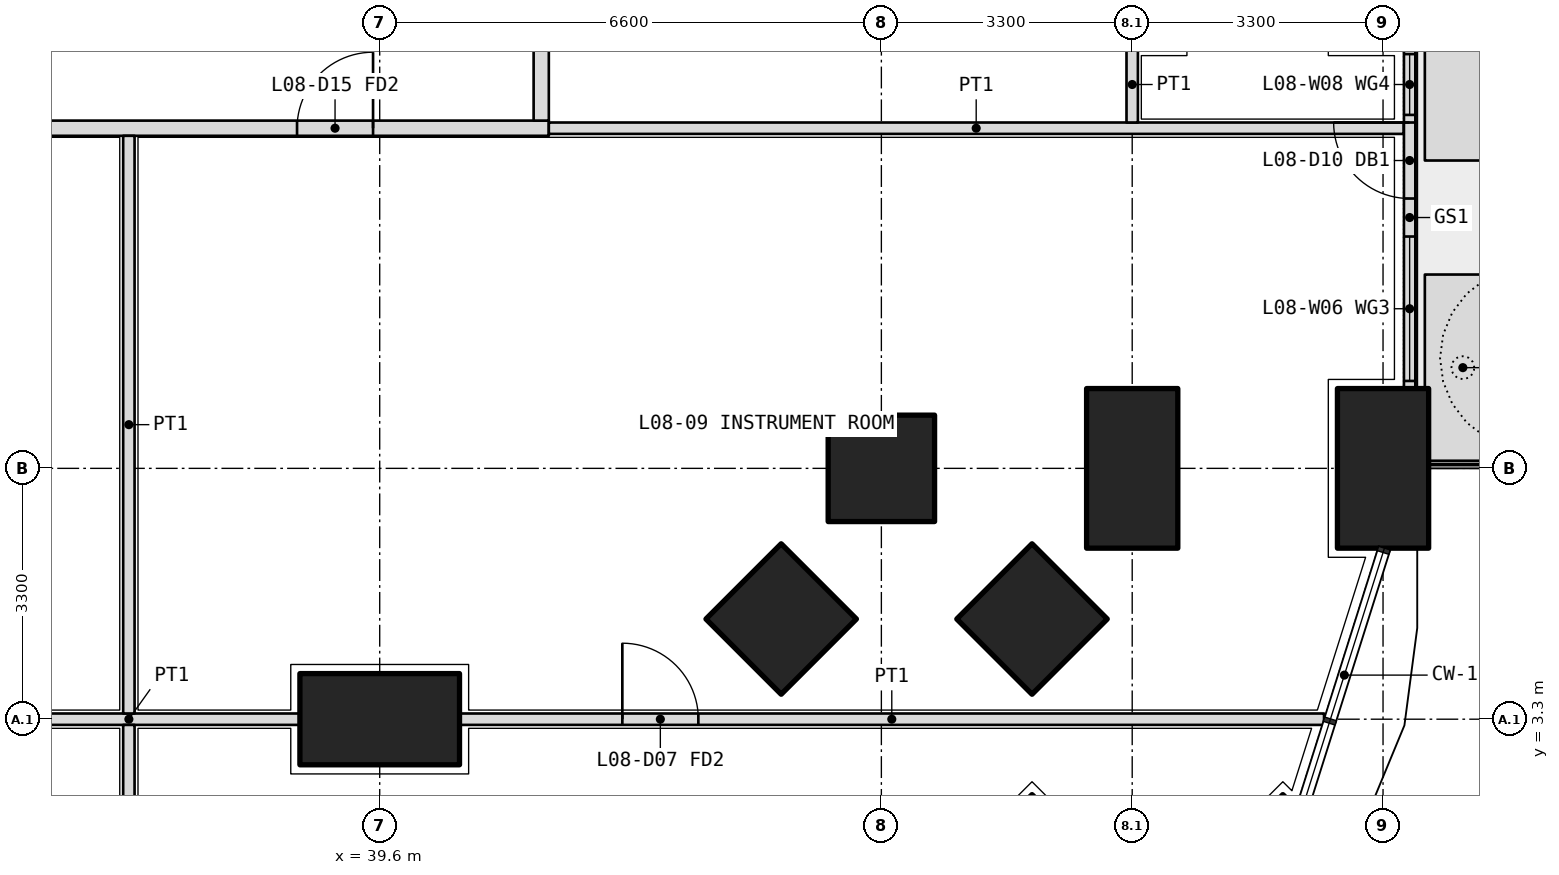
"""IFC4 building model, lengths in metres.
Left out: names, types, materials, properties, quantities, classifications, styles, units other than length and angle.
Written with IfcOpenShell. Run it as: python <this file> out.ifc"""

import sys

from ifc_helpers import new_model, si_unit, direction, frame, frame_2d, origin, origin_2d, place, context, subcontext, project, spatial, polyline, rectangle, outline, extrude, element, fill, save


model = new_model("IFC4")
c1 = context("Model", 3, precision=1e-05, world=origin(), true_north=direction((0.0, 1.0)))
c2 = subcontext(c1, "Body", "Model", "MODEL_VIEW")
j1 = project(units=[si_unit("LENGTHUNIT", "METRE"), si_unit("PLANEANGLEUNIT", "RADIAN")], contexts=[c1])
p1 = place(None, origin())
s1 = spatial("IfcSite", under=j1, at=p1, CompositionType="ELEMENT")
p2 = place(p1, origin())
s2 = spatial("IfcBuilding", under=s1, at=p2, CompositionType="ELEMENT")
p3 = place(p2, frame((0.0, 0.0, 38.1)))
s3 = spatial("IfcBuildingStorey", under=s2, at=p3, CompositionType="ELEMENT", Elevation=38.1)
p4 = place(p3, frame((51.482, 1.318, 0.0), z_axis=(0.0, 0.0, 1.0), x_axis=(0.707106781187, 0.707106781187, 0.0)))
e1 = element("IfcColumn", 1, at=p4, inside=s3, PredefinedType="COLUMN", context=c2, shape_type="SweptSolid", body=[
    extrude(rectangle(XDim=1.4, YDim=1.4, at=origin_2d()), origin(), (0.0, 0.0, 1.0), 4.2),
])
p5 = place(p3, frame((52.8, 6.6, 0.0), z_axis=(0.0, 0.0, 1.0), x_axis=(0.0, 1.0, 0.0)))
e2 = element("IfcColumn", 2, at=p5, inside=s3, PredefinedType="COLUMN", context=c2, shape_type="SweptSolid", body=[
    extrude(rectangle(XDim=2.1, YDim=1.2, at=origin_2d()), origin(), (0.0, 0.0, 1.0), 4.2),
])
for number, where, z_axis, x_axis in (
    (3, (46.2, 6.6, 0.0), (0.0, 0.0, 1.0), (1.0, 0.0, 0.0)),
    (4, (48.182, 1.318, 0.0), (0.0, 0.0, 1.0), (0.707, 0.707, 0.0)),
):
    element("IfcColumn", number, at=place(p3, frame(where, z_axis=z_axis, x_axis=x_axis)), inside=s3, PredefinedType="COLUMN", context=c2, shape_type="SweptSolid", body=[
        extrude(rectangle(XDim=1.4, YDim=1.4, at=origin_2d()), origin(), (0.0, 0.0, 1.0), 4.2),
    ])
p6 = place(p3, frame((49.5, 6.6, 0.0), z_axis=(0.0, 0.0, 1.0), x_axis=(0.0, 1.0, 0.0)))
e5 = element("IfcColumn", 5, at=p6, inside=s3, PredefinedType="COLUMN", context=c2, shape_type="SweptSolid", body=[
    extrude(rectangle(XDim=2.1, YDim=1.2, at=origin_2d()), origin(), (0.0, 0.0, 1.0), 4.2),
])
p7 = place(p3, frame((48.182, 4.618, 0.0), z_axis=(0.0, 0.0, 1.0), x_axis=(0.707106781187, 0.707106781187, 0.0)))
e6 = element("IfcColumn", 6, at=p7, inside=s3, PredefinedType="COLUMN", context=c2, shape_type="SweptSolid", body=[
    extrude(rectangle(XDim=1.4, YDim=1.4, at=origin_2d()), origin(), (0.0, 0.0, 1.0), 4.2),
])
p8 = place(p3, frame((39.6, 3.3, 0.0), z_axis=(0.0, 0.0, 1.0), x_axis=(1.0, 0.0, 0.0)))
e7 = element("IfcColumn", 7, at=p8, inside=s3, PredefinedType="COLUMN", context=c2, shape_type="SweptSolid", body=[
    extrude(rectangle(XDim=2.1, YDim=1.2, at=origin_2d()), origin(), (0.0, 0.0, 1.0), 4.2),
])
p9 = place(p3, frame((44.882, 4.618, 0.0), z_axis=(0.0, 0.0, 1.0), x_axis=(0.707106781187, 0.707106781187, 0.0)))
e8 = element("IfcColumn", 8, at=p9, inside=s3, PredefinedType="COLUMN", context=c2, shape_type="SweptSolid", body=[
    extrude(rectangle(XDim=1.4, YDim=1.4, at=origin_2d()), origin(), (0.0, 0.0, 1.0), 4.2),
])
p10 = place(p3, origin())
e9 = element("IfcWall", 9, at=p10, inside=s3, PredefinedType="USERDEFINED", context=c2, shape_type="SweptSolid", body=[
    extrude(outline(polyline([(53.35, 6.7), (54.35, 6.7), (54.35, 9.15), (53.35, 9.15), (53.35, 6.7)]), holes=[polyline([(53.5, 6.85), (54.2, 6.85), (54.2, 9.0), (53.5, 9.0), (53.5, 6.85)])]), origin(), (0.0, 0.0, 1.0), 1.05),
])
p11 = place(p3, origin())
e10 = element("IfcWall", 10, at=p11, inside=s3, PredefinedType="USERDEFINED", context=c2, shape_type="SweptSolid", body=[
    extrude(outline(polyline([(53.35, 10.65), (54.35, 10.65), (54.35, 19.7), (53.35, 19.7), (53.35, 10.65)]), holes=[polyline([(53.5, 10.8), (54.2, 10.8), (54.2, 19.55), (53.5, 19.55), (53.5, 10.8)])]), origin(), (0.0, 0.0, 1.0), 1.05),
])
p12 = place(p3, frame((53.15, 7.65, 0.0), z_axis=(0.0, 0.0, 1.0), x_axis=(0.0, 1.0, 0.0)))
e11 = element("IfcWall", 11, at=p12, inside=s3, PredefinedType="SOLIDWALL", context=c2, shape_type="SweptSolid", body=[
    extrude(rectangle(XDim=4.5, YDim=0.15, at=frame_2d((2.25, 0.0))), origin(), (0.0, 0.0, 1.0), 2.7),
])
p13 = place(p12, frame((2.5, 0.0, 0.0)))
e12 = element("IfcOpeningElement", 12, at=p13, cuts=e11, PredefinedType="OPENING", context=c2, shape_type="SweptSolid", body=[
    extrude(rectangle(XDim=1.0, YDim=2.4, at=frame_2d((0.5, 1.2))), frame((0.0, 0.085, 0.0), z_axis=(0.0, -1.0, 0.0), x_axis=(1.0, 0.0, 0.0)), (0.0, 0.0, 1.0), 0.17),
])
p14 = place(p12, frame((0.1, 0.0, 0.1)))
e13 = element("IfcOpeningElement", 13, at=p14, cuts=e11, PredefinedType="OPENING", context=c2, shape_type="SweptSolid", body=[
    extrude(rectangle(XDim=1.9, YDim=2.3, at=frame_2d((0.95, 1.15))), frame((0.0, 0.085, 0.0), z_axis=(0.0, -1.0, 0.0), x_axis=(1.0, 0.0, 0.0)), (0.0, 0.0, 1.0), 0.17),
])
p15 = place(p12, frame((3.6, 0.0, 0.1)))
e14 = element("IfcOpeningElement", 14, at=p15, cuts=e11, PredefinedType="OPENING", context=c2, shape_type="SweptSolid", body=[
    extrude(rectangle(XDim=0.8, YDim=2.3, at=frame_2d((0.4, 1.15))), frame((0.0, 0.085, 0.0), z_axis=(0.0, -1.0, 0.0), x_axis=(1.0, 0.0, 0.0)), (0.0, 0.0, 1.0), 0.17),
])
p16 = place(p3, frame((10.975, 11.075, 0.0), z_axis=(0.0, 0.0, 1.0), x_axis=(1.0, 0.0, 0.0)))
e15 = element("IfcWall", 15, at=p16, inside=s3, PredefinedType="PARTITIONING", context=c2, shape_type="SweptSolid", body=[
    extrude(rectangle(XDim=30.85, YDim=0.2, at=frame_2d((15.425, 0.0))), origin(), (0.0, 0.0, 1.0), 2.85),
])
p17 = place(p16, frame((2.312, 0.0, 0.0)))
e16 = element("IfcOpeningElement", 16, at=p17, cuts=e15, PredefinedType="OPENING", context=c2, shape_type="SweptSolid", body=[
    extrude(rectangle(XDim=1.0, YDim=2.1, at=frame_2d((0.5, 1.05))), frame((0.0, 0.11, 0.0), z_axis=(0.0, -1.0, 0.0), x_axis=(1.0, 0.0, 0.0)), (0.0, 0.0, 1.0), 0.22),
])
p18 = place(p16, frame((8.325, 0.0, 0.0)))
e17 = element("IfcOpeningElement", 17, at=p18, cuts=e15, PredefinedType="OPENING", context=c2, shape_type="SweptSolid", body=[
    extrude(rectangle(XDim=1.0, YDim=2.1, at=frame_2d((0.5, 1.05))), frame((0.0, 0.11, 0.0), z_axis=(0.0, -1.0, 0.0), x_axis=(1.0, 0.0, 0.0)), (0.0, 0.0, 1.0), 0.22),
])
p19 = place(p16, frame((13.175, 0.0, 0.0)))
e18 = element("IfcOpeningElement", 18, at=p19, cuts=e15, PredefinedType="OPENING", context=c2, shape_type="SweptSolid", body=[
    extrude(rectangle(XDim=1.2, YDim=2.1, at=frame_2d((0.6, 1.05))), frame((0.0, 0.11, 0.0), z_axis=(0.0, -1.0, 0.0), x_axis=(1.0, 0.0, 0.0)), (0.0, 0.0, 1.0), 0.22),
])
p20 = place(p16, frame((19.875, 0.0, 0.0)))
e19 = element("IfcOpeningElement", 19, at=p20, cuts=e15, PredefinedType="OPENING", context=c2, shape_type="SweptSolid", body=[
    extrude(rectangle(XDim=1.0, YDim=2.1, at=frame_2d((0.5, 1.05))), frame((0.0, 0.11, 0.0), z_axis=(0.0, -1.0, 0.0), x_axis=(1.0, 0.0, 0.0)), (0.0, 0.0, 1.0), 0.22),
])
p21 = place(p16, frame((27.538, 0.0, 0.0)))
e20 = element("IfcOpeningElement", 20, at=p21, cuts=e15, PredefinedType="OPENING", context=c2, shape_type="SweptSolid", body=[
    extrude(rectangle(XDim=1.0, YDim=2.1, at=frame_2d((0.5, 1.05))), frame((0.0, 0.11, 0.0), z_axis=(0.0, -1.0, 0.0), x_axis=(1.0, 0.0, 0.0)), (0.0, 0.0, 1.0), 0.22),
])
p22 = place(p3, frame((41.725, 11.175, 0.0), z_axis=(0.0, 0.0, 1.0), x_axis=(0.0, 1.0, 0.0)))
e21 = element("IfcWall", 21, at=p22, inside=s3, PredefinedType="PARTITIONING", context=c2, shape_type="SweptSolid", body=[
    extrude(rectangle(XDim=23.85, YDim=0.2, at=frame_2d((11.925, 0.0))), origin(), (0.0, 0.0, 1.0), 2.85),
])
p23 = place(p22, frame((2.113, 0.0, 0.0)))
e22 = element("IfcOpeningElement", 22, at=p23, cuts=e21, PredefinedType="OPENING", context=c2, shape_type="SweptSolid", body=[
    extrude(rectangle(XDim=1.0, YDim=2.1, at=frame_2d((0.5, 1.05))), frame((0.0, 0.11, 0.0), z_axis=(0.0, -1.0, 0.0), x_axis=(1.0, 0.0, 0.0)), (0.0, 0.0, 1.0), 0.22),
])
p24 = place(p22, frame((6.475, 0.0, 0.0)))
e23 = element("IfcOpeningElement", 23, at=p24, cuts=e21, PredefinedType="OPENING", context=c2, shape_type="SweptSolid", body=[
    extrude(rectangle(XDim=1.0, YDim=2.1, at=frame_2d((0.5, 1.05))), frame((0.0, 0.11, 0.0), z_axis=(0.0, -1.0, 0.0), x_axis=(1.0, 0.0, 0.0)), (0.0, 0.0, 1.0), 0.22),
])
p25 = place(p22, frame((9.625, 0.0, 0.0)))
e24 = element("IfcOpeningElement", 24, at=p25, cuts=e21, PredefinedType="OPENING", context=c2, shape_type="SweptSolid", body=[
    extrude(rectangle(XDim=1.0, YDim=2.1, at=frame_2d((0.5, 1.05))), frame((0.0, 0.11, 0.0), z_axis=(0.0, -1.0, 0.0), x_axis=(1.0, 0.0, 0.0)), (0.0, 0.0, 1.0), 0.22),
])
p26 = place(p22, frame((12.975, 0.0, 0.0)))
e25 = element("IfcOpeningElement", 25, at=p26, cuts=e21, PredefinedType="OPENING", context=c2, shape_type="SweptSolid", body=[
    extrude(rectangle(XDim=0.9, YDim=2.1, at=frame_2d((0.45, 1.05))), frame((0.0, 0.11, 0.0), z_axis=(0.0, -1.0, 0.0), x_axis=(1.0, 0.0, 0.0)), (0.0, 0.0, 1.0), 0.22),
])
p27 = place(p22, frame((19.087, 0.0, 0.0)))
e26 = element("IfcOpeningElement", 26, at=p27, cuts=e21, PredefinedType="OPENING", context=c2, shape_type="SweptSolid", body=[
    extrude(rectangle(XDim=1.0, YDim=2.1, at=frame_2d((0.5, 1.05))), frame((0.0, 0.11, 0.0), z_axis=(0.0, -1.0, 0.0), x_axis=(1.0, 0.0, 0.0)), (0.0, 0.0, 1.0), 0.22),
])
p28 = place(p3, frame((53.07, 11.075, 0.0), z_axis=(0.0, 0.0, 1.0), x_axis=(-1.0, 0.0, 0.0)))
e27 = element("IfcWall", 27, at=p28, inside=s3, PredefinedType="PARTITIONING", context=c2, shape_type="SweptSolid", body=[
    extrude(rectangle(XDim=11.245, YDim=0.15, at=frame_2d((5.623, 0.0))), origin(), (0.0, 0.0, 1.0), 2.7),
])
p29 = place(p3, frame((34.05, 3.3, 0.0), z_axis=(0.0, 0.0, 1.0), x_axis=(1.0, 0.0, 0.0)))
e28 = element("IfcWall", 28, at=p29, inside=s3, PredefinedType="PARTITIONING", context=c2, shape_type="SweptSolid", body=[
    extrude(rectangle(XDim=4.5, YDim=0.15, at=frame_2d((2.25, 0.0))), origin(), (0.0, 0.0, 1.0), 3.9),
])
p30 = place(p3, frame((40.65, 3.3, 0.0), z_axis=(0.0, 0.0, 1.0), x_axis=(1.0, 0.0, 0.0)))
e29 = element("IfcWall", 29, at=p30, inside=s3, PredefinedType="PARTITIONING", context=c2, shape_type="SweptSolid", body=[
    extrude(rectangle(XDim=11.374, YDim=0.15, at=frame_2d((5.687, 0.0))), origin(), (0.0, 0.0, 1.0), 2.7),
])
p31 = place(p30, frame((2.142, 0.0, 0.0)))
e30 = element("IfcOpeningElement", 30, at=p31, cuts=e29, PredefinedType="OPENING", context=c2, shape_type="SweptSolid", body=[
    extrude(rectangle(XDim=1.0, YDim=2.1, at=frame_2d((0.5, 1.05))), frame((0.0, 0.085, 0.0), z_axis=(0.0, -1.0, 0.0), x_axis=(1.0, 0.0, 0.0)), (0.0, 0.0, 1.0), 0.17),
])
p32 = place(p3, frame((36.3, -0.27, 0.0), z_axis=(0.0, 0.0, 1.0), x_axis=(0.0, 1.0, 0.0)))
e31 = element("IfcWall", 31, at=p32, inside=s3, PredefinedType="PARTITIONING", context=c2, shape_type="SweptSolid", body=[
    extrude(rectangle(XDim=3.495, YDim=0.15, at=frame_2d((1.748, 0.0))), origin(), (0.0, 0.0, 1.0), 2.7),
])
p33 = place(p3, frame((36.3, 3.375, 0.0), z_axis=(0.0, 0.0, 1.0), x_axis=(0.0, 1.0, 0.0)))
e32 = element("IfcWall", 32, at=p33, inside=s3, PredefinedType="PARTITIONING", context=c2, shape_type="SweptSolid", body=[
    extrude(rectangle(XDim=7.6, YDim=0.15, at=frame_2d((3.8, 0.0))), origin(), (0.0, 0.0, 1.0), 3.9),
])
p34 = place(p3, frame((49.5, 11.15, 0.0), z_axis=(0.0, 0.0, 1.0), x_axis=(0.0, 1.0, 0.0)))
e33 = element("IfcWall", 33, at=p34, inside=s3, PredefinedType="PARTITIONING", context=c2, shape_type="SweptSolid", body=[
    extrude(rectangle(XDim=1.0, YDim=0.15, at=frame_2d((0.5, 0.0))), origin(), (0.0, 0.0, 1.0), 3.9),
])
p35 = place(p13, origin())
e34 = element("IfcDoor", 34, at=p35, inside=s3, OperationType="SINGLE_SWING_RIGHT", PredefinedType="DOOR", context=c2, shape_type="SweptSolid", body=[
    extrude(rectangle(XDim=1.0, YDim=2.4, at=frame_2d((0.5, 1.2))), frame((0.0, 0.025, 0.0), z_axis=(0.0, -1.0, 0.0), x_axis=(1.0, 0.0, 0.0)), (0.0, 0.0, 1.0), 0.05),
])
fill(e12, e34)
p36 = place(p14, origin())
e35 = element("IfcWindow", 35, at=p36, inside=s3, PartitioningType="SINGLE_PANEL", PredefinedType="WINDOW", context=c2, shape_type="SweptSolid", body=[
    extrude(rectangle(XDim=1.9, YDim=2.3, at=frame_2d((0.95, 1.15))), frame((0.0, 0.03, 0.0), z_axis=(0.0, -1.0, 0.0), x_axis=(1.0, 0.0, 0.0)), (0.0, 0.0, 1.0), 0.06),
])
fill(e13, e35)
p37 = place(p15, origin())
e36 = element("IfcWindow", 36, at=p37, inside=s3, PartitioningType="SINGLE_PANEL", PredefinedType="WINDOW", context=c2, shape_type="SweptSolid", body=[
    extrude(rectangle(XDim=0.8, YDim=2.3, at=frame_2d((0.4, 1.15))), frame((0.0, 0.03, 0.0), z_axis=(0.0, -1.0, 0.0), x_axis=(1.0, 0.0, 0.0)), (0.0, 0.0, 1.0), 0.06),
])
fill(e14, e36)
p38 = place(p21, origin())
e37 = element("IfcDoor", 37, at=p38, inside=s3, OperationType="SINGLE_SWING_RIGHT", PredefinedType="DOOR", context=c2, shape_type="SweptSolid", body=[
    extrude(rectangle(XDim=1.0, YDim=2.1, at=frame_2d((0.5, 1.05))), frame((0.0, 0.025, 0.0), z_axis=(0.0, -1.0, 0.0), x_axis=(1.0, 0.0, 0.0)), (0.0, 0.0, 1.0), 0.05),
])
fill(e20, e37)
p39 = place(p31, origin())
e38 = element("IfcDoor", 38, at=p39, inside=s3, OperationType="SINGLE_SWING_LEFT", PredefinedType="DOOR", context=c2, shape_type="SweptSolid", body=[
    extrude(rectangle(XDim=1.0, YDim=2.1, at=frame_2d((0.5, 1.05))), frame((0.0, 0.025, 0.0), z_axis=(0.0, -1.0, 0.0), x_axis=(1.0, 0.0, 0.0)), (0.0, 0.0, 1.0), 0.05),
])
fill(e30, e38)
save(model, sys.argv[1])
